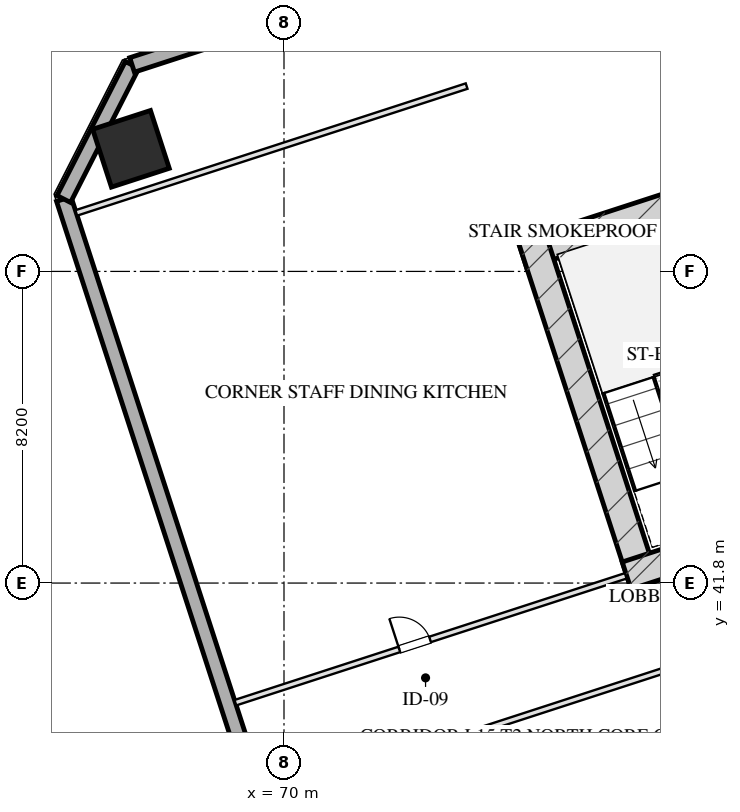
"""IFC4 building model, lengths in metres.
Left out: names, types, materials, properties, quantities, classifications, styles, units other than length and angle.
Written with IfcOpenShell. Run it as: python <this file> out.ifc"""

import sys

from ifc_helpers import new_model, si_unit, direction, frame, frame_2d, origin, origin_2d, place, context, subcontext, project, spatial, rectangle, hollow_rectangle, extrude, element, fill, save


model = new_model("IFC4")
c1 = context("Model", 3, precision=1e-05, world=origin(), true_north=direction((0.0, 1.0)))
c2 = subcontext(c1, "Body", "Model", "MODEL_VIEW")
j1 = project(units=[si_unit("LENGTHUNIT", "METRE"), si_unit("PLANEANGLEUNIT", "RADIAN")], contexts=[c1])
p1 = place(None, origin())
s1 = spatial("IfcSite", under=j1, at=p1, CompositionType="ELEMENT")
p2 = place(p1, origin())
s2 = spatial("IfcBuilding", under=s1, at=p2, CompositionType="ELEMENT")
p3 = place(p2, frame((0.0, 0.0, 64.4)))
s3 = spatial("IfcBuildingStorey", under=s2, at=p3, CompositionType="ELEMENT", Elevation=64.4)
p4 = place(p3, frame((76.272, 50.443, 0.0), z_axis=(0.0, 0.0, 1.0), x_axis=(0.951056072937, 0.309018358888, 0.0)))
e1 = element("IfcWall", 1, at=p4, inside=s3, PredefinedType="SHEAR", context=c2, shape_type="SweptSolid", body=[
    extrude(rectangle(XDim=16.55, YDim=0.75, at=frame_2d((8.275, 0.0))), origin(), (0.0, 0.0, 1.0), 3.45),
])
p5 = place(p3, frame((79.489, 41.756, 0.0), z_axis=(0.0, 0.0, 1.0), x_axis=(-0.309016134813, 0.951056795583, 0.0)))
e2 = element("IfcWall", 2, at=p5, inside=s3, PredefinedType="SHEAR", context=c2, shape_type="SweptSolid", body=[
    extrude(rectangle(XDim=9.63, YDim=0.75, at=frame_2d((4.815, 0.0))), origin(), (0.0, 0.0, 1.0), 3.45),
])
p6 = place(p3, frame((79.016, 41.997, 0.0), z_axis=(0.0, 0.0, 1.0), x_axis=(0.95106038264, 0.309005094736, 0.0)))
e3 = element("IfcWall", 3, at=p6, inside=s3, PredefinedType="SHEAR", context=c2, shape_type="SweptSolid", body=[
    extrude(rectangle(XDim=4.295, YDim=0.75, at=frame_2d((2.147, 0.0))), origin(), (0.0, 0.0, 1.0), 3.45),
])
p7 = place(p3, frame((65.973, 53.226, 0.0), z_axis=(0.0, 0.0, 1.0), x_axis=(0.951056516295, 0.309016994375, 0.0)))
e4 = element("IfcColumn", 4, at=p7, inside=s3, PredefinedType="COLUMN", context=c2, shape_type="SweptSolid", body=[
    extrude(hollow_rectangle(XDim=1.6, YDim=1.6, WallThickness=0.055, at=origin_2d()), origin(), (0.0, 0.0, 1.0), 3.451),
])
p8 = place(p3, frame((79.655, 4.352, 0.0), z_axis=(0.0, 0.0, 1.0), x_axis=(-0.309014526607, 0.951057318118, 0.0)))
e5 = element("IfcWall", 5, at=p8, inside=s3, PredefinedType="SOLIDWALL", context=c2, shape_type="SweptSolid", body=[
    extrude(rectangle(XDim=50.0, YDim=0.4, at=frame_2d((25.0, 0.0))), origin(), (0.0, 0.0, 1.0), 2.61),
])
p9 = place(p8, frame((17.35, 0.0, 0.75)))
e6 = element("IfcOpeningElement", 6, at=p9, cuts=e5, PredefinedType="OPENING", context=c2, shape_type="SweptSolid", body=[
    extrude(rectangle(XDim=2.5, YDim=1.46, at=frame_2d((1.25, 0.73))), frame((0.0, 0.21, 0.0), z_axis=(0.0, -1.0, 0.0), x_axis=(1.0, 0.0, 0.0)), (0.0, 0.0, 1.0), 0.42),
])
p10 = place(p8, frame((30.15, 0.0, 0.75)))
e7 = element("IfcOpeningElement", 7, at=p10, cuts=e5, PredefinedType="OPENING", context=c2, shape_type="SweptSolid", body=[
    extrude(rectangle(XDim=2.5, YDim=1.46, at=frame_2d((1.25, 0.73))), frame((0.0, 0.21, 0.0), z_axis=(0.0, -1.0, 0.0), x_axis=(1.0, 0.0, 0.0)), (0.0, 0.0, 1.0), 0.42),
])
p11 = place(p3, frame((64.205, 51.905, 0.0), z_axis=(0.0, 0.0, 1.0), x_axis=(0.453958106755, 0.891023028497, 0.0)))
e8 = element("IfcWall", 8, at=p11, inside=s3, PredefinedType="SOLIDWALL", context=c2, shape_type="SweptSolid", body=[
    extrude(rectangle(XDim=3.96, YDim=0.4, at=frame_2d((1.98, 0.0))), origin(), (0.0, 0.0, 1.0), 2.61),
])
p12 = place(p3, frame((66.002, 55.433, 0.0), z_axis=(0.0, 0.0, 1.0), x_axis=(0.951055939317, 0.309018770125, 0.0)))
e9 = element("IfcWall", 9, at=p12, inside=s3, PredefinedType="SOLIDWALL", context=c2, shape_type="SweptSolid", body=[
    extrude(rectangle(XDim=32.4, YDim=0.4, at=frame_2d((16.2, 0.0))), origin(), (0.0, 0.0, 1.0), 2.61),
])
p13 = place(p3, frame((64.534, 51.539, 0.0), z_axis=(0.0, 0.0, 1.0), x_axis=(0.951056658866, 0.309016555588, 0.0)))
e10 = element("IfcWall", 10, at=p13, inside=s3, PredefinedType="PARTITIONING", context=c2, shape_type="SweptSolid", body=[
    extrude(rectangle(XDim=10.8, YDim=0.15, at=frame_2d((5.4, 0.0))), origin(), (0.0, 0.0, 1.0), 3.175),
])
p14 = place(p3, frame((68.721, 38.652, 0.0), z_axis=(0.0, 0.0, 1.0), x_axis=(0.951056658866, 0.309016555588, 0.0)))
e11 = element("IfcWall", 11, at=p14, inside=s3, PredefinedType="PARTITIONING", context=c2, shape_type="SweptSolid", body=[
    extrude(rectangle(XDim=10.8, YDim=0.15, at=frame_2d((5.4, 0.0))), origin(), (0.0, 0.0, 1.0), 3.175),
])
p15 = place(p14, frame((4.536, 0.0, 0.0)))
e12 = element("IfcOpeningElement", 12, at=p15, cuts=e11, PredefinedType="OPENING", context=c2, shape_type="SweptSolid", body=[
    extrude(rectangle(XDim=0.85, YDim=2.05, at=frame_2d((0.425, 1.025))), frame((0.0, 0.085, 0.0), z_axis=(0.0, -1.0, 0.0), x_axis=(1.0, 0.0, 0.0)), (0.0, 0.0, 1.0), 0.17),
])
p16 = place(p3, frame((69.549, 36.103, 0.0), z_axis=(0.0, 0.0, 1.0), x_axis=(0.951057299418, 0.309014584159, 0.0)))
e13 = element("IfcWall", 13, at=p16, inside=s3, PredefinedType="PARTITIONING", context=c2, shape_type="SweptSolid", body=[
    extrude(rectangle(XDim=17.375, YDim=0.15, at=frame_2d((8.688, 0.0))), origin(), (0.0, 0.0, 1.0), 3.175),
])
p17 = place(p15, origin())
e14 = element("IfcDoor", 14, at=p17, inside=s3, OperationType="SINGLE_SWING_LEFT", PredefinedType="DOOR", context=c2, shape_type="SweptSolid", body=[
    extrude(rectangle(XDim=0.85, YDim=2.05, at=frame_2d((0.425, 1.025))), frame((0.0, 0.025, 0.0), z_axis=(0.0, -1.0, 0.0), x_axis=(1.0, 0.0, 0.0)), (0.0, 0.0, 1.0), 0.05),
])
fill(e12, e14)
save(model, sys.argv[1])
